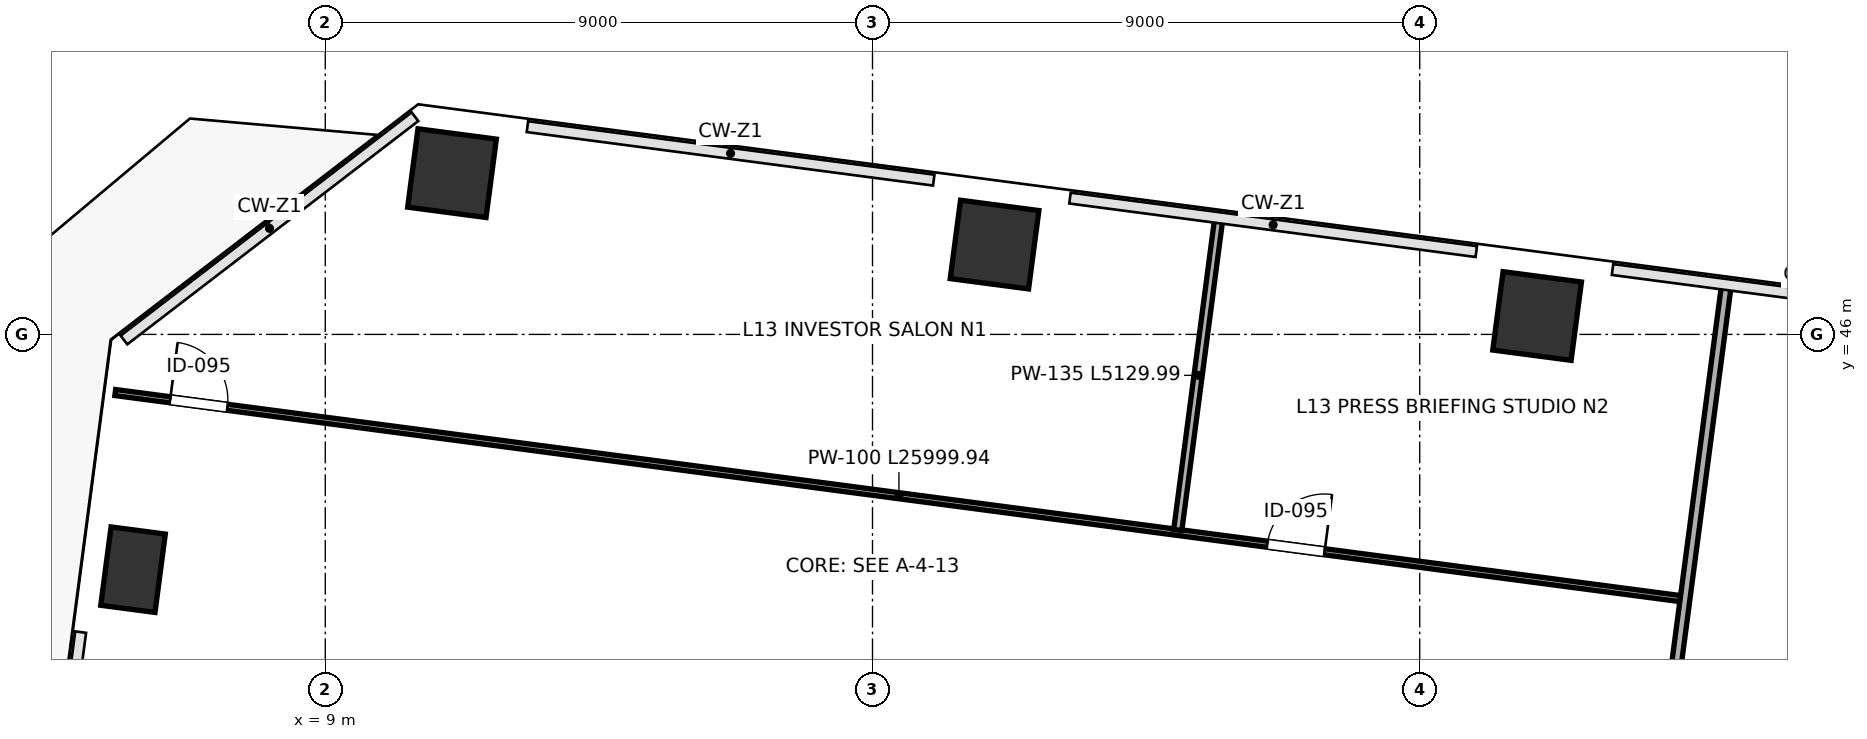
"""IFC4 building model, lengths in metres.
Left out: names, types, materials, properties, quantities, classifications, styles, units other than length and angle.
Written with IfcOpenShell. Run it as: python <this file> out.ifc"""

import sys

from ifc_helpers import new_model, si_unit, direction, frame, frame_2d, origin, origin_2d, place, context, subcontext, project, spatial, rectangle, extrude, source, transform, mapped, element, fill, save


model = new_model("IFC4")
c1 = context("Model", 3, precision=1e-05, world=origin(), true_north=direction((0.0, 1.0)))
c2 = subcontext(c1, "Body", "Model", "MODEL_VIEW")
j1 = project(units=[si_unit("LENGTHUNIT", "METRE"), si_unit("PLANEANGLEUNIT", "RADIAN")], contexts=[c1])
p1 = place(None, origin())
s1 = spatial("IfcSite", under=j1, at=p1, CompositionType="ELEMENT")
p2 = place(p1, origin())
s2 = spatial("IfcBuilding", under=s1, at=p2, CompositionType="ELEMENT")
p3 = place(p2, frame((0.0, 0.0, 61.6)))
s3 = spatial("IfcBuildingStorey", under=s2, at=p3, CompositionType="ELEMENT", Elevation=61.6)
m1 = source(origin(), c2, "Body", "SweptSolid", [
    extrude(rectangle(XDim=1.3, YDim=1.3, at=origin_2d()), origin(), (0.0, 0.0, 1.0), 4.798),
])
for number, where, z_axis, x_axis in (
    (1, (11.084, 48.652, 0.001), (0.0, 0.0, 1.0), (-0.991, 0.131, 0.0)),
    (2, (20.007, 47.477, 0.001), (0.0, 0.0, 1.0), (-0.991, 0.131, 0.0)),
    (3, (28.93, 46.302, 0.001), (0.0, 0.0, 1.0), (-0.991, 0.131, 0.0)),
):
    element("IfcColumn", number, at=place(p3, frame(where, z_axis=z_axis, x_axis=x_axis)), inside=s3, PredefinedType="COLUMN", context=c2, shape_type="MappedRepresentation", body=[
        mapped(m1, transform((0.0, 0.0, 0.0), scale=1.0)),
    ])
m2 = source(origin(), c2, "Body", "SweptSolid", [
    extrude(rectangle(XDim=0.9, YDim=1.3, at=origin_2d()), origin(), (0.0, 0.0, 1.0), 4.798),
])
p4 = place(p3, frame((5.838, 42.131, 0.001), z_axis=(0.0, 0.0, 1.0), x_axis=(-0.991444861374, 0.13052619222, 0.0)))
e4 = element("IfcColumn", 4, at=p4, inside=s3, PredefinedType="PILASTER", context=c2, shape_type="MappedRepresentation", body=[
    mapped(m2, transform((0.0, 0.0, 0.0), scale=1.0)),
])
p5 = place(p3, frame((5.546, 45.044, 0.0), z_axis=(0.0, 0.0, 1.0), x_axis=(0.99144534416, -0.13052252504, 0.0)))
e5 = element("IfcWall", 5, at=p5, inside=s3, PredefinedType="PARTITIONING", context=c2, shape_type="SweptSolid", body=[
    extrude(rectangle(XDim=26.0, YDim=0.1, at=frame_2d((13.0, 0.0))), origin(), (0.0, 0.0, 1.0), 4.56),
])
p6 = place(p5, frame((0.91, 0.0, 0.0)))
e6 = element("IfcOpeningElement", 6, at=p6, cuts=e5, PredefinedType="OPENING", context=c2, shape_type="SweptSolid", body=[
    extrude(rectangle(XDim=0.95, YDim=2.15, at=frame_2d((0.475, 1.075))), frame((0.0, 0.06, 0.0), z_axis=(0.0, -1.0, 0.0), x_axis=(1.0, 0.0, 0.0)), (0.0, 0.0, 1.0), 0.12),
])
p7 = place(p5, frame((19.11, 0.0, 0.0)))
e7 = element("IfcOpeningElement", 7, at=p7, cuts=e5, PredefinedType="OPENING", context=c2, shape_type="SweptSolid", body=[
    extrude(rectangle(XDim=0.95, YDim=2.15, at=frame_2d((0.475, 1.075))), frame((0.0, 0.06, 0.0), z_axis=(0.0, -1.0, 0.0), x_axis=(1.0, 0.0, 0.0)), (0.0, 0.0, 1.0), 0.12),
])
p8 = place(p3, frame((23.021, 42.784, 0.0), z_axis=(0.0, 0.0, 1.0), x_axis=(0.130539454953, 0.991443115212, 0.0)))
e8 = element("IfcWall", 8, at=p8, inside=s3, PredefinedType="PARTITIONING", context=c2, shape_type="SweptSolid", body=[
    extrude(rectangle(XDim=5.13, YDim=0.135, at=frame_2d((2.565, 0.0))), origin(), (0.0, 0.0, 1.0), 3.695),
])
p9 = place(p3, frame((29.644, 28.588, 0.0), z_axis=(0.0, 0.0, 1.0), x_axis=(0.130525105318, 0.991445004467, 0.0)))
e9 = element("IfcWall", 9, at=p9, inside=s3, PredefinedType="PARTITIONING", context=c2, shape_type="SweptSolid", body=[
    extrude(rectangle(XDim=18.34, YDim=0.16, at=frame_2d((9.17, 0.0))), origin(), (0.0, 0.0, 1.0), 3.695),
])
m3 = source(origin(), c2, "Body", "SweptSolid", [
    extrude(rectangle(XDim=0.95, YDim=2.15, at=frame_2d((0.475, 1.075))), frame((0.0, 0.025, 0.0), z_axis=(0.0, -1.0, 0.0), x_axis=(1.0, 0.0, 0.0)), (0.0, 0.0, 1.0), 0.05),
])
p10 = place(p6, origin())
e10 = element("IfcDoor", 10, at=p10, inside=s3, OperationType="SINGLE_SWING_LEFT", PredefinedType="DOOR", context=c2, shape_type="MappedRepresentation", body=[
    mapped(m3, transform((0.0, 0.0, 0.0), scale=1.0)),
])
fill(e6, e10)
p11 = place(p7, origin())
e11 = element("IfcDoor", 11, at=p11, inside=s3, OperationType="SINGLE_SWING_RIGHT", PredefinedType="DOOR", context=c2, shape_type="MappedRepresentation", body=[
    mapped(m3, transform((0.0, 0.0, 0.0), scale=1.0)),
])
fill(e7, e11)
save(model, sys.argv[1])
